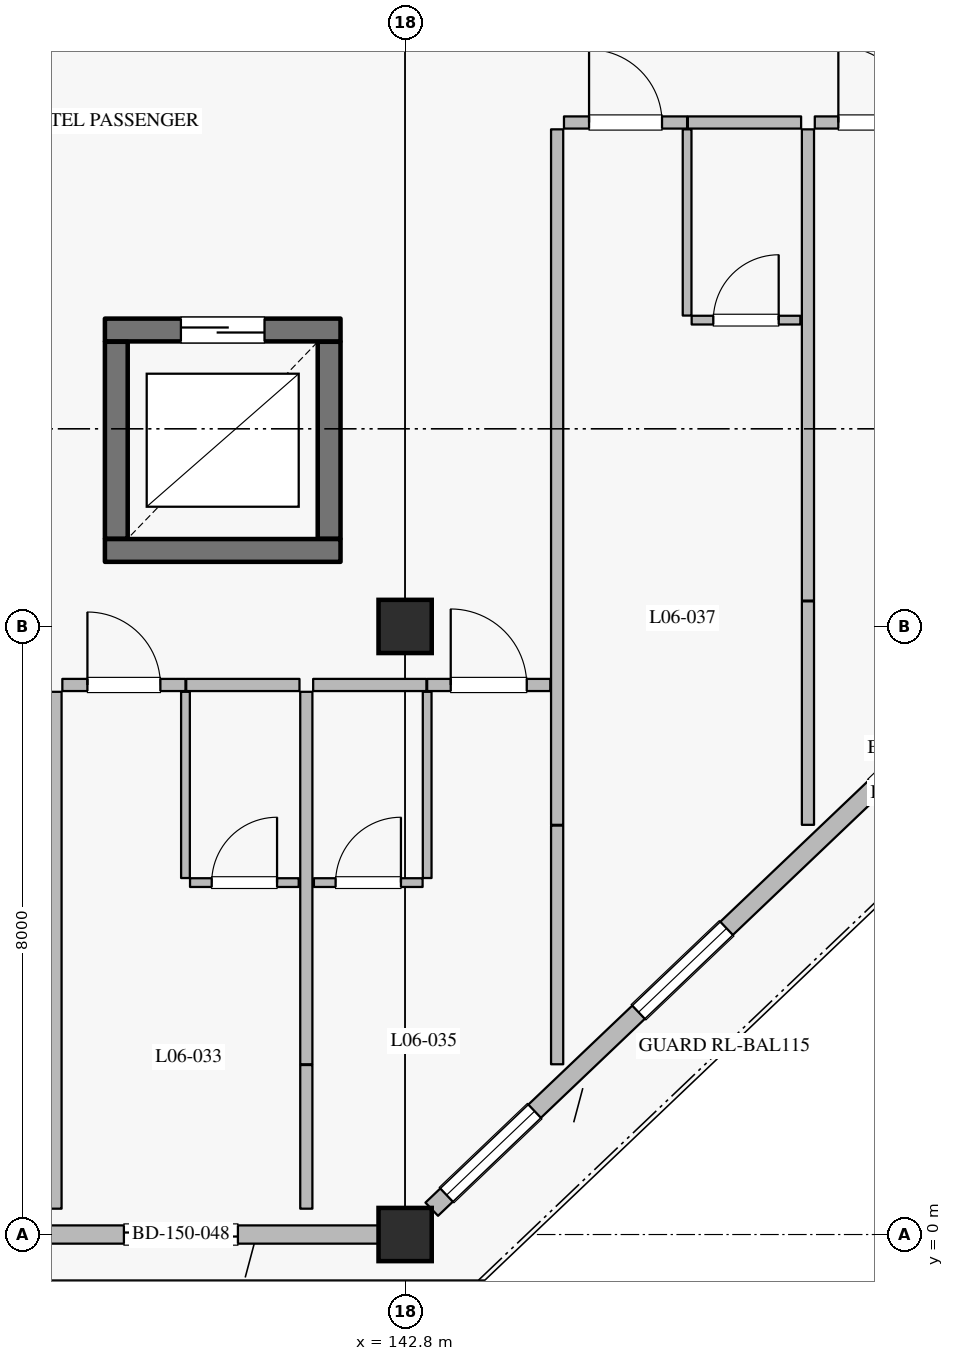
"""IFC4 building model, lengths in metres.
Left out: names, types, materials, properties, quantities, classifications, styles, units other than length and angle.
Written with IfcOpenShell. Run it as: python <this file> out.ifc"""

import sys

from ifc_helpers import new_model, si_unit, direction, frame, frame_2d, origin, origin_2d, place, context, subcontext, project, spatial, rectangle, extrude, element, fill, save


model = new_model("IFC4")
c1 = context("Model", 3, precision=1e-05, world=origin(), true_north=direction((0.0, 1.0)))
c2 = subcontext(c1, "Body", "Model", "MODEL_VIEW")
j1 = project(units=[si_unit("LENGTHUNIT", "METRE"), si_unit("PLANEANGLEUNIT", "RADIAN")], contexts=[c1])
p1 = place(None, origin())
s1 = spatial("IfcSite", under=j1, at=p1, CompositionType="ELEMENT")
p2 = place(p1, origin())
s2 = spatial("IfcBuilding", under=s1, at=p2, CompositionType="ELEMENT")
p3 = place(p2, frame((0.0, 0.0, 28.8)))
s3 = spatial("IfcBuildingStorey", under=s2, at=p3, CompositionType="ELEMENT", Elevation=28.8)
for number, where, z_axis, x_axis in (
    (1, (142.8, 0.0, 0.0), (0.0, 0.0, 1.0), (1.0, 0.0, 0.0)),
    (2, (142.8, 8.0, 0.0), (0.0, 0.0, 1.0), (1.0, 0.0, 0.0)),
):
    element("IfcColumn", number, at=place(p3, frame(where, z_axis=z_axis, x_axis=x_axis)), inside=s3, PredefinedType="COLUMN", context=c2, shape_type="SweptSolid", body=[
        extrude(rectangle(XDim=0.7, YDim=0.7, at=origin_2d()), origin(), (0.0, 0.0, 1.0), 3.6),
    ])
p4 = place(p3, frame((142.45, 0.0, 0.0), z_axis=(0.0, 0.0, 1.0), x_axis=(-1.0, 0.0, 0.0)))
e3 = element("IfcWall", 3, at=p4, inside=s3, PredefinedType="SOLIDWALL", context=c2, shape_type="SweptSolid", body=[
    extrude(rectangle(XDim=7.7, YDim=0.24, at=frame_2d((3.85, 0.0))), origin(), (0.0, 0.0, 1.0), 2.93),
])
p5 = place(p4, frame((1.85, 0.0, 0.0)))
e4 = element("IfcOpeningElement", 4, at=p5, cuts=e3, PredefinedType="OPENING", context=c2, shape_type="SweptSolid", body=[
    extrude(rectangle(XDim=1.5, YDim=2.25, at=frame_2d((0.75, 1.125))), frame((0.0, 0.13, 0.0), z_axis=(0.0, -1.0, 0.0), x_axis=(1.0, 0.0, 0.0)), (0.0, 0.0, 1.0), 0.26),
])
p6 = place(p4, frame((5.1, 0.0, 0.8)))
e5 = element("IfcOpeningElement", 5, at=p6, cuts=e3, PredefinedType="OPENING", context=c2, shape_type="SweptSolid", body=[
    extrude(rectangle(XDim=1.6, YDim=1.6, at=frame_2d((0.8, 0.8))), frame((0.0, 0.13, 0.0), z_axis=(0.0, -1.0, 0.0), x_axis=(1.0, 0.0, 0.0)), (0.0, 0.0, 1.0), 0.26),
])
p7 = place(p3, frame((150.85, 7.667, 0.0), z_axis=(0.0, 0.0, 1.0), x_axis=(-0.724116091282, -0.689678103427, 0.0)))
e6 = element("IfcWall", 6, at=p7, inside=s3, PredefinedType="SOLIDWALL", context=c2, shape_type="SweptSolid", body=[
    extrude(rectangle(XDim=10.634, YDim=0.24, at=frame_2d((5.317, 0.0))), origin(), (0.0, 0.0, 1.0), 2.93),
])
p8 = place(p7, frame((1.08, 0.0, 0.0)))
e7 = element("IfcOpeningElement", 7, at=p8, cuts=e6, PredefinedType="OPENING", context=c2, shape_type="SweptSolid", body=[
    extrude(rectangle(XDim=1.5, YDim=2.25, at=frame_2d((0.75, 1.125))), frame((0.0, 0.13, 0.0), z_axis=(0.0, -1.0, 0.0), x_axis=(1.0, 0.0, 0.0)), (0.0, 0.0, 1.0), 0.26),
])
p9 = place(p7, frame((5.276, 0.0, 0.8)))
e8 = element("IfcOpeningElement", 8, at=p9, cuts=e6, PredefinedType="OPENING", context=c2, shape_type="SweptSolid", body=[
    extrude(rectangle(XDim=1.6, YDim=1.6, at=frame_2d((0.8, 0.8))), frame((0.0, 0.13, 0.0), z_axis=(0.0, -1.0, 0.0), x_axis=(1.0, 0.0, 0.0)), (0.0, 0.0, 1.0), 0.26),
])
p10 = place(p7, frame((8.764, 0.0, 0.8)))
e9 = element("IfcOpeningElement", 9, at=p10, cuts=e6, PredefinedType="OPENING", context=c2, shape_type="SweptSolid", body=[
    extrude(rectangle(XDim=1.6, YDim=1.6, at=frame_2d((0.8, 0.8))), frame((0.0, 0.13, 0.0), z_axis=(0.0, -1.0, 0.0), x_axis=(1.0, 0.0, 0.0)), (0.0, 0.0, 1.0), 0.26),
])
p11 = place(p3, frame((138.85, 9.0, 0.0), z_axis=(0.0, 0.0, 1.0), x_axis=(1.0, 0.0, 0.0)))
e10 = element("IfcWall", 10, at=p11, inside=s3, PredefinedType="SHEAR", context=c2, shape_type="SweptSolid", body=[
    extrude(rectangle(XDim=3.1, YDim=0.3, at=frame_2d((1.55, 0.0))), origin(), (0.0, 0.0, 1.0), 3.365),
])
p12 = place(p3, frame((141.8, 9.155, 0.0), z_axis=(0.0, 0.0, 1.0), x_axis=(0.0, 1.0, 0.0)))
e11 = element("IfcWall", 11, at=p12, inside=s3, PredefinedType="SHEAR", context=c2, shape_type="SweptSolid", body=[
    extrude(rectangle(XDim=2.59, YDim=0.3, at=frame_2d((1.295, 0.0))), origin(), (0.0, 0.0, 1.0), 3.365),
])
p13 = place(p3, frame((141.95, 11.9, 0.0), z_axis=(0.0, 0.0, 1.0), x_axis=(-1.0, 0.0, 0.0)))
e12 = element("IfcWall", 12, at=p13, inside=s3, PredefinedType="SHEAR", context=c2, shape_type="SweptSolid", body=[
    extrude(rectangle(XDim=3.1, YDim=0.3, at=frame_2d((1.55, 0.0))), origin(), (0.0, 0.0, 1.0), 3.365),
])
p14 = place(p13, frame((1.0, 0.0, 0.0)))
e13 = element("IfcOpeningElement", 13, at=p14, cuts=e12, PredefinedType="OPENING", context=c2, shape_type="SweptSolid", body=[
    extrude(rectangle(XDim=1.1, YDim=2.2, at=frame_2d((0.55, 1.1))), frame((0.0, 0.16, 0.0), z_axis=(0.0, -1.0, 0.0), x_axis=(1.0, 0.0, 0.0)), (0.0, 0.0, 1.0), 0.32),
])
p15 = place(p3, frame((139.0, 11.745, 0.0), z_axis=(0.0, 0.0, 1.0), x_axis=(0.0, -1.0, 0.0)))
e14 = element("IfcWall", 14, at=p15, inside=s3, PredefinedType="SHEAR", context=c2, shape_type="SweptSolid", body=[
    extrude(rectangle(XDim=2.59, YDim=0.3, at=frame_2d((1.295, 0.0))), origin(), (0.0, 0.0, 1.0), 3.365),
])
p16 = place(p3, frame((138.29, 7.23, 0.0), z_axis=(0.0, 0.0, 1.0), x_axis=(1.0, 0.0, 0.0)))
e15 = element("IfcWall", 15, at=p16, inside=s3, PredefinedType="PARTITIONING", context=c2, shape_type="SweptSolid", body=[
    extrude(rectangle(XDim=1.62, YDim=0.16, at=frame_2d((0.81, 0.0))), origin(), (0.0, 0.0, 1.0), 3.365),
])
p17 = place(p16, frame((0.33, 0.0, 0.0)))
e16 = element("IfcOpeningElement", 16, at=p17, cuts=e15, PredefinedType="OPENING", context=c2, shape_type="SweptSolid", body=[
    extrude(rectangle(XDim=0.96, YDim=2.2, at=frame_2d((0.48, 1.1))), frame((0.0, 0.09, 0.0), z_axis=(0.0, -1.0, 0.0), x_axis=(1.0, 0.0, 0.0)), (0.0, 0.0, 1.0), 0.18),
])
p18 = place(p3, frame((139.92, 7.23, 0.0), z_axis=(0.0, 0.0, 1.0), x_axis=(1.0, 0.0, 0.0)))
e17 = element("IfcWall", 17, at=p18, inside=s3, PredefinedType="PARTITIONING", context=c2, shape_type="SweptSolid", body=[
    extrude(rectangle(XDim=1.49, YDim=0.16, at=frame_2d((0.745, 0.0))), origin(), (0.0, 0.0, 1.0), 3.365),
])
p19 = place(p3, frame((139.91, 4.69, 0.0), z_axis=(0.0, 0.0, 1.0), x_axis=(0.0, 1.0, 0.0)))
e18 = element("IfcWall", 18, at=p19, inside=s3, PredefinedType="PARTITIONING", context=c2, shape_type="SweptSolid", body=[
    extrude(rectangle(XDim=2.45, YDim=0.115, at=frame_2d((1.225, 0.0))), origin(), (0.0, 0.0, 1.0), 3.365),
])
p20 = place(p3, frame((139.97, 4.63, 0.0), z_axis=(0.0, 0.0, 1.0), x_axis=(1.0, 0.0, 0.0)))
e19 = element("IfcWall", 19, at=p20, inside=s3, PredefinedType="PARTITIONING", context=c2, shape_type="SweptSolid", body=[
    extrude(rectangle(XDim=1.43, YDim=0.115, at=frame_2d((0.715, 0.0))), origin(), (0.0, 0.0, 1.0), 3.365),
])
p21 = place(p20, frame((0.285, 0.0, 0.0)))
e20 = element("IfcOpeningElement", 20, at=p21, cuts=e19, PredefinedType="OPENING", context=c2, shape_type="SweptSolid", body=[
    extrude(rectangle(XDim=0.86, YDim=2.12, at=frame_2d((0.43, 1.06))), frame((0.0, 0.067, 0.0), z_axis=(0.0, -1.0, 0.0), x_axis=(1.0, 0.0, 0.0)), (0.0, 0.0, 1.0), 0.135),
])
p22 = place(p3, frame((138.2, 0.34, 0.0), z_axis=(0.0, 0.0, 1.0), x_axis=(0.0, 1.0, 0.0)))
e21 = element("IfcWall", 21, at=p22, inside=s3, PredefinedType="PARTITIONING", context=c2, shape_type="SweptSolid", body=[
    extrude(rectangle(XDim=6.8, YDim=0.16, at=frame_2d((3.4, 0.0))), origin(), (0.0, 0.0, 1.0), 3.365),
])
p23 = place(p3, frame((141.5, 0.34, 0.0), z_axis=(0.0, 0.0, 1.0), x_axis=(0.0, 1.0, 0.0)))
e22 = element("IfcWall", 22, at=p23, inside=s3, PredefinedType="PARTITIONING", context=c2, shape_type="SweptSolid", body=[
    extrude(rectangle(XDim=1.89, YDim=0.16, at=frame_2d((0.945, 0.0))), origin(), (0.0, 0.0, 1.0), 3.365),
])
p24 = place(p3, frame((141.59, 7.23, 0.0), z_axis=(0.0, 0.0, 1.0), x_axis=(1.0, 0.0, 0.0)))
e23 = element("IfcWall", 23, at=p24, inside=s3, PredefinedType="PARTITIONING", context=c2, shape_type="SweptSolid", body=[
    extrude(rectangle(XDim=1.49, YDim=0.16, at=frame_2d((0.745, 0.0))), origin(), (0.0, 0.0, 1.0), 3.365),
])
p25 = place(p3, frame((143.09, 7.23, 0.0), z_axis=(0.0, 0.0, 1.0), x_axis=(1.0, 0.0, 0.0)))
e24 = element("IfcWall", 24, at=p25, inside=s3, PredefinedType="PARTITIONING", context=c2, shape_type="SweptSolid", body=[
    extrude(rectangle(XDim=1.62, YDim=0.16, at=frame_2d((0.81, 0.0))), origin(), (0.0, 0.0, 1.0), 3.365),
])
p26 = place(p25, frame((0.31, 0.0, 0.0)))
e25 = element("IfcOpeningElement", 25, at=p26, cuts=e24, PredefinedType="OPENING", context=c2, shape_type="SweptSolid", body=[
    extrude(rectangle(XDim=1.0, YDim=2.25, at=frame_2d((0.5, 1.125))), frame((0.0, 0.09, 0.0), z_axis=(0.0, -1.0, 0.0), x_axis=(1.0, 0.0, 0.0)), (0.0, 0.0, 1.0), 0.18),
])
p27 = place(p3, frame((143.09, 4.69, 0.0), z_axis=(0.0, 0.0, 1.0), x_axis=(0.0, 1.0, 0.0)))
e26 = element("IfcWall", 26, at=p27, inside=s3, PredefinedType="PARTITIONING", context=c2, shape_type="SweptSolid", body=[
    extrude(rectangle(XDim=2.45, YDim=0.115, at=frame_2d((1.225, 0.0))), origin(), (0.0, 0.0, 1.0), 3.365),
])
p28 = place(p3, frame((141.6, 4.63, 0.0), z_axis=(0.0, 0.0, 1.0), x_axis=(1.0, 0.0, 0.0)))
e27 = element("IfcWall", 27, at=p28, inside=s3, PredefinedType="PARTITIONING", context=c2, shape_type="SweptSolid", body=[
    extrude(rectangle(XDim=1.43, YDim=0.115, at=frame_2d((0.715, 0.0))), origin(), (0.0, 0.0, 1.0), 3.365),
])
p29 = place(p28, frame((0.285, 0.0, 0.0)))
e28 = element("IfcOpeningElement", 28, at=p29, cuts=e27, PredefinedType="OPENING", context=c2, shape_type="SweptSolid", body=[
    extrude(rectangle(XDim=0.86, YDim=2.12, at=frame_2d((0.43, 1.06))), frame((0.0, 0.067, 0.0), z_axis=(0.0, -1.0, 0.0), x_axis=(1.0, 0.0, 0.0)), (0.0, 0.0, 1.0), 0.135),
])
p30 = place(p3, frame((141.5, 2.24, 0.0), z_axis=(0.0, 0.0, 1.0), x_axis=(0.0, 1.0, 0.0)))
e29 = element("IfcWall", 29, at=p30, inside=s3, PredefinedType="PARTITIONING", context=c2, shape_type="SweptSolid", body=[
    extrude(rectangle(XDim=4.9, YDim=0.16, at=frame_2d((2.45, 0.0))), origin(), (0.0, 0.0, 1.0), 3.365),
])
p31 = place(p3, frame((144.8, 2.24, 0.0), z_axis=(0.0, 0.0, 1.0), x_axis=(0.0, 1.0, 0.0)))
e30 = element("IfcWall", 30, at=p31, inside=s3, PredefinedType="PARTITIONING", context=c2, shape_type="SweptSolid", body=[
    extrude(rectangle(XDim=3.14, YDim=0.16, at=frame_2d((1.57, 0.0))), origin(), (0.0, 0.0, 1.0), 3.365),
])
p32 = place(p3, frame((144.89, 14.63, 0.0), z_axis=(0.0, 0.0, 1.0), x_axis=(1.0, 0.0, 0.0)))
e31 = element("IfcWall", 31, at=p32, inside=s3, PredefinedType="PARTITIONING", context=c2, shape_type="SweptSolid", body=[
    extrude(rectangle(XDim=1.62, YDim=0.16, at=frame_2d((0.81, 0.0))), origin(), (0.0, 0.0, 1.0), 3.365),
])
p33 = place(p32, frame((0.33, 0.0, 0.0)))
e32 = element("IfcOpeningElement", 32, at=p33, cuts=e31, PredefinedType="OPENING", context=c2, shape_type="SweptSolid", body=[
    extrude(rectangle(XDim=0.96, YDim=2.2, at=frame_2d((0.48, 1.1))), frame((0.0, 0.09, 0.0), z_axis=(0.0, -1.0, 0.0), x_axis=(1.0, 0.0, 0.0)), (0.0, 0.0, 1.0), 0.18),
])
p34 = place(p3, frame((146.52, 14.63, 0.0), z_axis=(0.0, 0.0, 1.0), x_axis=(1.0, 0.0, 0.0)))
e33 = element("IfcWall", 33, at=p34, inside=s3, PredefinedType="PARTITIONING", context=c2, shape_type="SweptSolid", body=[
    extrude(rectangle(XDim=1.49, YDim=0.16, at=frame_2d((0.745, 0.0))), origin(), (0.0, 0.0, 1.0), 3.365),
])
p35 = place(p3, frame((146.51, 12.09, 0.0), z_axis=(0.0, 0.0, 1.0), x_axis=(0.0, 1.0, 0.0)))
e34 = element("IfcWall", 34, at=p35, inside=s3, PredefinedType="PARTITIONING", context=c2, shape_type="SweptSolid", body=[
    extrude(rectangle(XDim=2.45, YDim=0.115, at=frame_2d((1.225, 0.0))), origin(), (0.0, 0.0, 1.0), 3.365),
])
p36 = place(p3, frame((146.57, 12.03, 0.0), z_axis=(0.0, 0.0, 1.0), x_axis=(1.0, 0.0, 0.0)))
e35 = element("IfcWall", 35, at=p36, inside=s3, PredefinedType="PARTITIONING", context=c2, shape_type="SweptSolid", body=[
    extrude(rectangle(XDim=1.43, YDim=0.115, at=frame_2d((0.715, 0.0))), origin(), (0.0, 0.0, 1.0), 3.365),
])
p37 = place(p36, frame((0.285, 0.0, 0.0)))
e36 = element("IfcOpeningElement", 36, at=p37, cuts=e35, PredefinedType="OPENING", context=c2, shape_type="SweptSolid", body=[
    extrude(rectangle(XDim=0.86, YDim=2.12, at=frame_2d((0.43, 1.06))), frame((0.0, 0.067, 0.0), z_axis=(0.0, -1.0, 0.0), x_axis=(1.0, 0.0, 0.0)), (0.0, 0.0, 1.0), 0.135),
])
p38 = place(p3, frame((144.8, 5.39, 0.0), z_axis=(0.0, 0.0, 1.0), x_axis=(0.0, 1.0, 0.0)))
e37 = element("IfcWall", 37, at=p38, inside=s3, PredefinedType="PARTITIONING", context=c2, shape_type="SweptSolid", body=[
    extrude(rectangle(XDim=9.15, YDim=0.16, at=frame_2d((4.575, 0.0))), origin(), (0.0, 0.0, 1.0), 3.365),
])
p39 = place(p3, frame((148.1, 5.39, 0.0), z_axis=(0.0, 0.0, 1.0), x_axis=(0.0, 1.0, 0.0)))
e38 = element("IfcWall", 38, at=p39, inside=s3, PredefinedType="PARTITIONING", context=c2, shape_type="SweptSolid", body=[
    extrude(rectangle(XDim=2.94, YDim=0.16, at=frame_2d((1.47, 0.0))), origin(), (0.0, 0.0, 1.0), 3.365),
])
p40 = place(p3, frame((148.19, 14.63, 0.0), z_axis=(0.0, 0.0, 1.0), x_axis=(1.0, 0.0, 0.0)))
e39 = element("IfcWall", 39, at=p40, inside=s3, PredefinedType="PARTITIONING", context=c2, shape_type="SweptSolid", body=[
    extrude(rectangle(XDim=1.62, YDim=0.16, at=frame_2d((0.81, 0.0))), origin(), (0.0, 0.0, 1.0), 3.365),
])
p41 = place(p40, frame((0.31, 0.0, 0.0)))
e40 = element("IfcOpeningElement", 40, at=p41, cuts=e39, PredefinedType="OPENING", context=c2, shape_type="SweptSolid", body=[
    extrude(rectangle(XDim=1.0, YDim=2.25, at=frame_2d((0.5, 1.125))), frame((0.0, 0.09, 0.0), z_axis=(0.0, -1.0, 0.0), x_axis=(1.0, 0.0, 0.0)), (0.0, 0.0, 1.0), 0.18),
])
p42 = place(p3, frame((148.1, 8.34, 0.0), z_axis=(0.0, 0.0, 1.0), x_axis=(0.0, 1.0, 0.0)))
e41 = element("IfcWall", 41, at=p42, inside=s3, PredefinedType="PARTITIONING", context=c2, shape_type="SweptSolid", body=[
    extrude(rectangle(XDim=6.2, YDim=0.16, at=frame_2d((3.1, 0.0))), origin(), (0.0, 0.0, 1.0), 3.365),
])
p43 = place(p5, origin())
e42 = element("IfcDoor", 42, at=p43, inside=s3, OperationType="SLIDING_TO_LEFT", PredefinedType="DOOR", context=c2, shape_type="SweptSolid", body=[
    extrude(rectangle(XDim=1.5, YDim=2.25, at=frame_2d((0.75, 1.125))), frame((0.0, 0.025, 0.0), z_axis=(0.0, -1.0, 0.0), x_axis=(1.0, 0.0, 0.0)), (0.0, 0.0, 1.0), 0.05),
])
fill(e4, e42)
p44 = place(p8, origin())
e43 = element("IfcDoor", 43, at=p44, inside=s3, OperationType="SLIDING_TO_LEFT", PredefinedType="DOOR", context=c2, shape_type="SweptSolid", body=[
    extrude(rectangle(XDim=1.5, YDim=2.25, at=frame_2d((0.75, 1.125))), frame((0.0, 0.025, 0.0), z_axis=(0.0, -1.0, 0.0), x_axis=(1.0, 0.0, 0.0)), (0.0, 0.0, 1.0), 0.05),
])
fill(e7, e43)
p45 = place(p9, origin())
e44 = element("IfcWindow", 44, at=p45, inside=s3, PartitioningType="SINGLE_PANEL", PredefinedType="WINDOW", context=c2, shape_type="SweptSolid", body=[
    extrude(rectangle(XDim=1.6, YDim=1.6, at=frame_2d((0.8, 0.8))), frame((0.0, 0.03, 0.0), z_axis=(0.0, -1.0, 0.0), x_axis=(1.0, 0.0, 0.0)), (0.0, 0.0, 1.0), 0.06),
])
fill(e8, e44)
p46 = place(p10, origin())
e45 = element("IfcWindow", 45, at=p46, inside=s3, PartitioningType="SINGLE_PANEL", PredefinedType="WINDOW", context=c2, shape_type="SweptSolid", body=[
    extrude(rectangle(XDim=1.6, YDim=1.6, at=frame_2d((0.8, 0.8))), frame((0.0, 0.03, 0.0), z_axis=(0.0, -1.0, 0.0), x_axis=(1.0, 0.0, 0.0)), (0.0, 0.0, 1.0), 0.06),
])
fill(e9, e45)
p47 = place(p14, origin())
e46 = element("IfcDoor", 46, at=p47, inside=s3, OperationType="DOUBLE_DOOR_SLIDING", PredefinedType="DOOR", context=c2, shape_type="SweptSolid", body=[
    extrude(rectangle(XDim=1.1, YDim=2.2, at=frame_2d((0.55, 1.1))), frame((0.0, 0.025, 0.0), z_axis=(0.0, -1.0, 0.0), x_axis=(1.0, 0.0, 0.0)), (0.0, 0.0, 1.0), 0.05),
])
fill(e13, e46)
p48 = place(p17, origin())
e47 = element("IfcDoor", 47, at=p48, inside=s3, OperationType="SINGLE_SWING_LEFT", PredefinedType="DOOR", context=c2, shape_type="SweptSolid", body=[
    extrude(rectangle(XDim=0.96, YDim=2.2, at=frame_2d((0.48, 1.1))), frame((0.0, 0.025, 0.0), z_axis=(0.0, -1.0, 0.0), x_axis=(1.0, 0.0, 0.0)), (0.0, 0.0, 1.0), 0.05),
])
fill(e16, e47)
p49 = place(p21, origin())
e48 = element("IfcDoor", 48, at=p49, inside=s3, OperationType="SINGLE_SWING_RIGHT", PredefinedType="DOOR", context=c2, shape_type="SweptSolid", body=[
    extrude(rectangle(XDim=0.86, YDim=2.12, at=frame_2d((0.43, 1.06))), frame((0.0, 0.025, 0.0), z_axis=(0.0, -1.0, 0.0), x_axis=(1.0, 0.0, 0.0)), (0.0, 0.0, 1.0), 0.05),
])
fill(e20, e48)
p50 = place(p26, origin())
e49 = element("IfcDoor", 49, at=p50, inside=s3, OperationType="SINGLE_SWING_LEFT", PredefinedType="DOOR", context=c2, shape_type="SweptSolid", body=[
    extrude(rectangle(XDim=1.0, YDim=2.25, at=frame_2d((0.5, 1.125))), frame((0.0, 0.025, 0.0), z_axis=(0.0, -1.0, 0.0), x_axis=(1.0, 0.0, 0.0)), (0.0, 0.0, 1.0), 0.05),
])
fill(e25, e49)
p51 = place(p29, origin())
e50 = element("IfcDoor", 50, at=p51, inside=s3, OperationType="SINGLE_SWING_RIGHT", PredefinedType="DOOR", context=c2, shape_type="SweptSolid", body=[
    extrude(rectangle(XDim=0.86, YDim=2.12, at=frame_2d((0.43, 1.06))), frame((0.0, 0.025, 0.0), z_axis=(0.0, -1.0, 0.0), x_axis=(1.0, 0.0, 0.0)), (0.0, 0.0, 1.0), 0.05),
])
fill(e28, e50)
p52 = place(p33, origin())
e51 = element("IfcDoor", 51, at=p52, inside=s3, OperationType="SINGLE_SWING_LEFT", PredefinedType="DOOR", context=c2, shape_type="SweptSolid", body=[
    extrude(rectangle(XDim=0.96, YDim=2.2, at=frame_2d((0.48, 1.1))), frame((0.0, 0.025, 0.0), z_axis=(0.0, -1.0, 0.0), x_axis=(1.0, 0.0, 0.0)), (0.0, 0.0, 1.0), 0.05),
])
fill(e32, e51)
p53 = place(p37, origin())
e52 = element("IfcDoor", 52, at=p53, inside=s3, OperationType="SINGLE_SWING_RIGHT", PredefinedType="DOOR", context=c2, shape_type="SweptSolid", body=[
    extrude(rectangle(XDim=0.86, YDim=2.12, at=frame_2d((0.43, 1.06))), frame((0.0, 0.025, 0.0), z_axis=(0.0, -1.0, 0.0), x_axis=(1.0, 0.0, 0.0)), (0.0, 0.0, 1.0), 0.05),
])
fill(e36, e52)
p54 = place(p41, origin())
e53 = element("IfcDoor", 53, at=p54, inside=s3, OperationType="SINGLE_SWING_LEFT", PredefinedType="DOOR", context=c2, shape_type="SweptSolid", body=[
    extrude(rectangle(XDim=1.0, YDim=2.25, at=frame_2d((0.5, 1.125))), frame((0.0, 0.025, 0.0), z_axis=(0.0, -1.0, 0.0), x_axis=(1.0, 0.0, 0.0)), (0.0, 0.0, 1.0), 0.05),
])
fill(e40, e53)
save(model, sys.argv[1])
